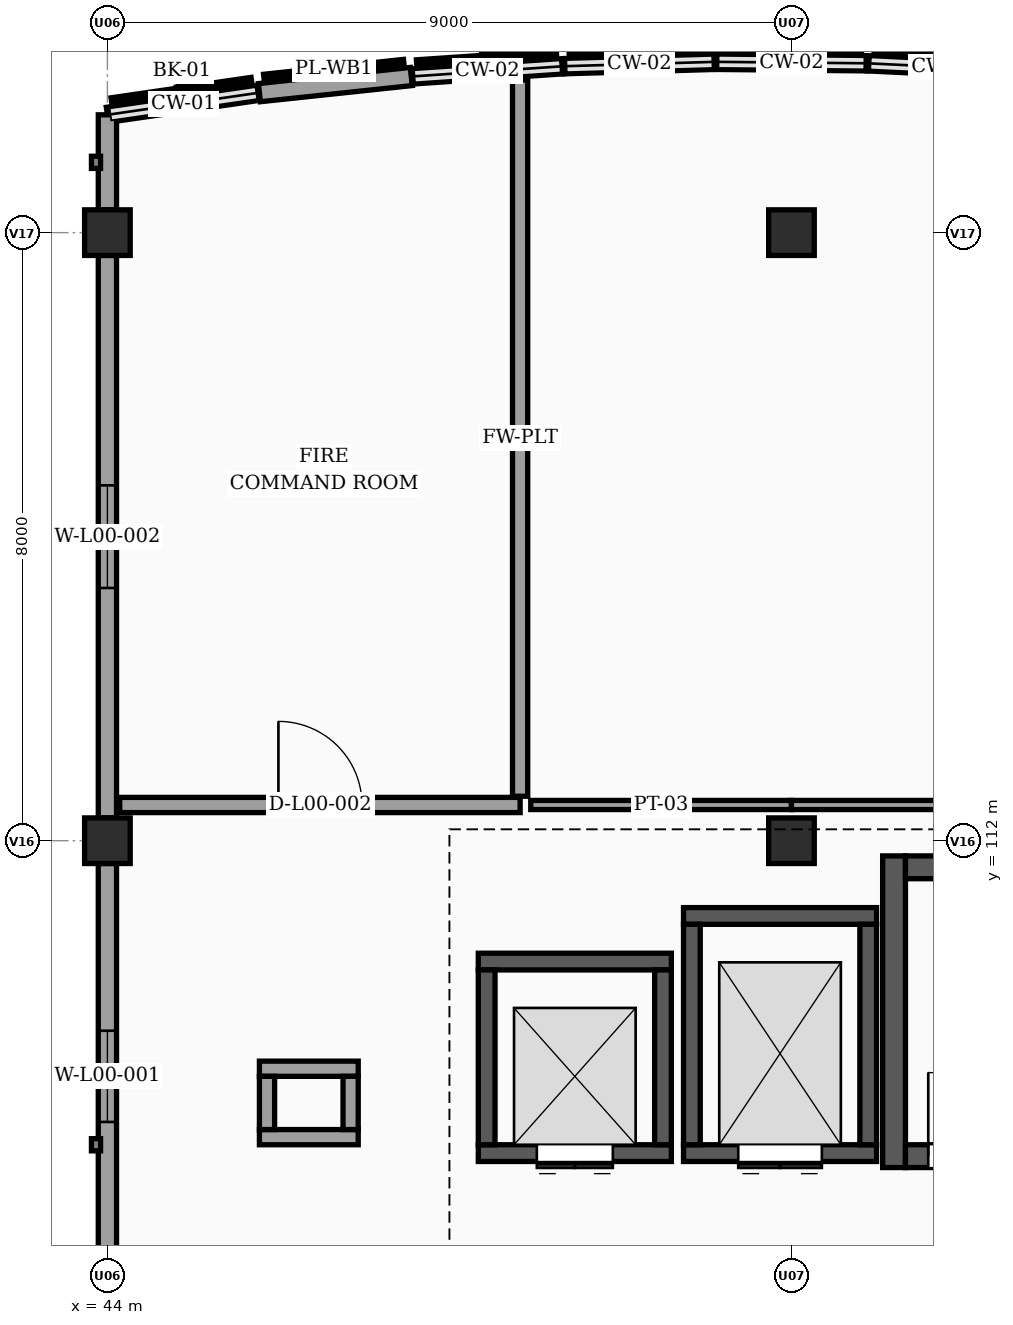
"""IFC4 building model, lengths in metres.
Left out: names, types, materials, properties, quantities, classifications, styles, units other than length and angle.
Written with IfcOpenShell. Run it as: python <this file> out.ifc"""

import sys

from ifc_helpers import new_model, si_unit, direction, frame, frame_2d, origin, origin_2d, place, context, subcontext, project, spatial, rectangle, extrude, element, fill, save


model = new_model("IFC4")
c1 = context("Model", 3, precision=1e-05, world=origin(), true_north=direction((0.0, 1.0)))
c2 = subcontext(c1, "Body", "Model", "MODEL_VIEW")
j1 = project(units=[si_unit("LENGTHUNIT", "METRE"), si_unit("PLANEANGLEUNIT", "RADIAN")], contexts=[c1])
p1 = place(None, origin())
s1 = spatial("IfcSite", under=j1, at=p1, CompositionType="ELEMENT")
p2 = place(p1, origin())
s2 = spatial("IfcBuilding", under=s1, at=p2, CompositionType="ELEMENT")
p3 = place(p2, origin())
s3 = spatial("IfcBuildingStorey", under=s2, at=p3, CompositionType="ELEMENT", Elevation=0.0)
for number, where, z_axis, x_axis in (
    (1, (44.0, 112.0, -0.2), (0.0, 0.0, 1.0), (1.0, 0.0, 0.0)),
    (2, (44.0, 120.0, -0.2), (0.0, 0.0, 1.0), (1.0, 0.0, 0.0)),
    (3, (53.0, 112.0, -0.2), (0.0, 0.0, 1.0), (1.0, 0.0, 0.0)),
    (4, (53.0, 120.0, -0.2), (0.0, 0.0, 1.0), (1.0, 0.0, 0.0)),
):
    element("IfcColumn", number, at=place(p3, frame(where, z_axis=z_axis, x_axis=x_axis)), inside=s3, PredefinedType="COLUMN", context=c2, shape_type="SweptSolid", body=[
        extrude(rectangle(XDim=0.6, YDim=0.6, at=origin_2d()), origin(), (0.0, 0.0, 1.0), 4.7),
    ])
p4 = place(p3, frame((44.0, 121.55, 0.0), z_axis=(0.0, 0.0, 1.0), x_axis=(0.989544477223, 0.144228040259, 0.0)))
e5 = element("IfcWall", 5, at=p4, inside=s3, PredefinedType="SOLIDWALL", context=c2, shape_type="SweptSolid", body=[
    extrude(rectangle(XDim=2.021, YDim=0.2, at=frame_2d((1.011, 0.0))), origin(), (0.0, 0.0, 1.0), 0.95),
])
p5 = place(p3, frame((46.0, 121.842, 0.0), z_axis=(0.0, 0.0, 1.0), x_axis=(0.994395160059, 0.105727317433, 0.0)))
e6 = element("IfcWall", 6, at=p5, inside=s3, PredefinedType="SOLIDWALL", context=c2, shape_type="SweptSolid", body=[
    extrude(rectangle(XDim=2.011, YDim=0.24, at=frame_2d((1.006, 0.0))), origin(), (0.0, 0.0, 1.0), 4.24),
])
p6 = place(p3, frame((48.0, 122.054, 0.0), z_axis=(0.0, 0.0, 1.0), x_axis=(0.997729302978, 0.067351599676, 0.0)))
e7 = element("IfcWall", 7, at=p6, inside=s3, PredefinedType="SOLIDWALL", context=c2, shape_type="SweptSolid", body=[
    extrude(rectangle(XDim=2.005, YDim=0.2, at=frame_2d((1.002, 0.0))), origin(), (0.0, 0.0, 1.0), 0.95),
])
p7 = place(p3, frame((50.0, 122.189, 0.0), z_axis=(0.0, 0.0, 1.0), x_axis=(0.999581770858, 0.028918564416, 0.0)))
e8 = element("IfcWall", 8, at=p7, inside=s3, PredefinedType="SOLIDWALL", context=c2, shape_type="SweptSolid", body=[
    extrude(rectangle(XDim=2.001, YDim=0.2, at=frame_2d((1.0, 0.0))), origin(), (0.0, 0.0, 1.0), 0.95),
])
p8 = place(p3, frame((52.0, 122.247, 0.0), z_axis=(0.0, 0.0, 1.0), x_axis=(0.999953504169, -0.009643106302, 0.0)))
e9 = element("IfcWall", 9, at=p8, inside=s3, PredefinedType="SOLIDWALL", context=c2, shape_type="SweptSolid", body=[
    extrude(rectangle(XDim=2.0, YDim=0.2, at=frame_2d((1.0, 0.0))), origin(), (0.0, 0.0, 1.0), 0.95),
])
p9 = place(p3, frame((54.0, 122.228, 0.0), z_axis=(0.0, 0.0, 1.0), x_axis=(0.99884540439, -0.048040172037, 0.0)))
e10 = element("IfcWall", 10, at=p9, inside=s3, PredefinedType="SOLIDWALL", context=c2, shape_type="SweptSolid", body=[
    extrude(rectangle(XDim=2.002, YDim=0.2, at=frame_2d((1.001, 0.0))), origin(), (0.0, 0.0, 1.0), 0.95),
])
p10 = place(p3, frame((44.0, 104.3, 0.0), z_axis=(0.0, 0.0, 1.0), x_axis=(0.0, 1.0, 0.0)))
e11 = element("IfcWall", 11, at=p10, inside=s3, PredefinedType="SOLIDWALL", context=c2, shape_type="SweptSolid", body=[
    extrude(rectangle(XDim=7.4, YDim=0.24, at=frame_2d((3.7, 0.0))), origin(), (0.0, 0.0, 1.0), 3.54),
])
p11 = place(p10, frame((4.0, 0.0, 0.95)))
e12 = element("IfcOpeningElement", 12, at=p11, cuts=e11, PredefinedType="OPENING", context=c2, shape_type="SweptSolid", body=[
    extrude(rectangle(XDim=1.2, YDim=1.5, at=frame_2d((0.6, 0.75))), frame((0.0, 0.13, 0.0), z_axis=(0.0, -1.0, 0.0), x_axis=(1.0, 0.0, 0.0)), (0.0, 0.0, 1.0), 0.26),
])
p12 = place(p3, frame((44.0, 112.3, 0.0), z_axis=(0.0, 0.0, 1.0), x_axis=(0.0, 1.0, 0.0)))
e13 = element("IfcWall", 13, at=p12, inside=s3, PredefinedType="SOLIDWALL", context=c2, shape_type="SweptSolid", body=[
    extrude(rectangle(XDim=7.4, YDim=0.24, at=frame_2d((3.7, 0.0))), origin(), (0.0, 0.0, 1.0), 3.54),
])
p13 = place(p12, frame((3.025, 0.0, 0.95)))
e14 = element("IfcOpeningElement", 14, at=p13, cuts=e13, PredefinedType="OPENING", context=c2, shape_type="SweptSolid", body=[
    extrude(rectangle(XDim=1.35, YDim=1.5, at=frame_2d((0.675, 0.75))), frame((0.0, 0.13, 0.0), z_axis=(0.0, -1.0, 0.0), x_axis=(1.0, 0.0, 0.0)), (0.0, 0.0, 1.0), 0.26),
])
p14 = place(p3, frame((44.0, 120.3, 0.0), z_axis=(0.0, 0.0, 1.0), x_axis=(0.0, 1.0, 0.0)))
e15 = element("IfcWall", 15, at=p14, inside=s3, PredefinedType="SOLIDWALL", context=c2, shape_type="SweptSolid", body=[
    extrude(rectangle(XDim=1.25, YDim=0.24, at=frame_2d((0.625, 0.0))), origin(), (0.0, 0.0, 1.0), 3.54),
])
p15 = place(p3, frame((54.35, 107.7, 0.0), z_axis=(0.0, 0.0, 1.0), x_axis=(0.0, 1.0, 0.0)))
e16 = element("IfcWall", 16, at=p15, inside=s3, PredefinedType="SHEAR", context=c2, shape_type="SweptSolid", body=[
    extrude(rectangle(XDim=4.1, YDim=0.3, at=frame_2d((2.05, 0.0))), origin(), (0.0, 0.0, 1.0), 4.24),
])
p16 = place(p3, frame((54.5, 107.85, 0.0), z_axis=(0.0, 0.0, 1.0), x_axis=(1.0, 0.0, 0.0)))
e17 = element("IfcWall", 17, at=p16, inside=s3, PredefinedType="SHEAR", context=c2, shape_type="SweptSolid", body=[
    extrude(rectangle(XDim=6.8, YDim=0.3, at=frame_2d((3.4, 0.0))), origin(), (0.0, 0.0, 1.0), 4.24),
])
p17 = place(p16, frame((0.3, 0.0, 0.0)))
e18 = element("IfcOpeningElement", 18, at=p17, cuts=e17, PredefinedType="OPENING", context=c2, shape_type="SweptSolid", body=[
    extrude(rectangle(XDim=1.1, YDim=2.15, at=frame_2d((0.55, 1.075))), frame((0.0, 0.16, 0.0), z_axis=(0.0, -1.0, 0.0), x_axis=(1.0, 0.0, 0.0)), (0.0, 0.0, 1.0), 0.32),
])
p18 = place(p3, frame((61.3, 111.65, 0.0), z_axis=(0.0, 0.0, 1.0), x_axis=(-1.0, 0.0, 0.0)))
e19 = element("IfcWall", 19, at=p18, inside=s3, PredefinedType="SHEAR", context=c2, shape_type="SweptSolid", body=[
    extrude(rectangle(XDim=6.8, YDim=0.3, at=frame_2d((3.4, 0.0))), origin(), (0.0, 0.0, 1.0), 4.24),
])
p19 = place(p3, frame((54.12, 107.89, 0.0), z_axis=(0.0, 0.0, 1.0), x_axis=(-1.0, 0.0, 0.0)))
e20 = element("IfcWall", 20, at=p19, inside=s3, PredefinedType="SHEAR", context=c2, shape_type="SweptSolid", body=[
    extrude(rectangle(XDim=2.54, YDim=0.22, at=frame_2d((1.27, 0.0))), origin(), (0.0, 0.0, 1.0), 4.24),
])
p20 = place(p19, frame((0.72, 0.0, 0.0)))
e21 = element("IfcOpeningElement", 21, at=p20, cuts=e20, PredefinedType="OPENING", context=c2, shape_type="SweptSolid", body=[
    extrude(rectangle(XDim=1.1, YDim=2.15, at=frame_2d((0.55, 1.075))), frame((0.0, 0.12, 0.0), z_axis=(0.0, -1.0, 0.0), x_axis=(1.0, 0.0, 0.0)), (0.0, 0.0, 1.0), 0.24),
])
p21 = place(p3, frame((51.58, 111.01, 0.0), z_axis=(0.0, 0.0, 1.0), x_axis=(1.0, 0.0, 0.0)))
e22 = element("IfcWall", 22, at=p21, inside=s3, PredefinedType="SHEAR", context=c2, shape_type="SweptSolid", body=[
    extrude(rectangle(XDim=2.54, YDim=0.22, at=frame_2d((1.27, 0.0))), origin(), (0.0, 0.0, 1.0), 4.24),
])
for number, where, z_axis, x_axis in (
    (23, (51.69, 108.0, 0.0), (0.0, 0.0, 1.0), (0.0, 1.0, 0.0)),
    (24, (54.01, 110.9, 0.0), (0.0, 0.0, 1.0), (0.0, -1.0, 0.0)),
):
    element("IfcWall", number, at=place(p3, frame(where, z_axis=z_axis, x_axis=x_axis)), inside=s3, PredefinedType="SHEAR", context=c2, shape_type="SweptSolid", body=[
        extrude(rectangle(XDim=2.9, YDim=0.22, at=frame_2d((1.45, 0.0))), origin(), (0.0, 0.0, 1.0), 4.24),
    ])
p22 = place(p3, frame((51.42, 107.89, 0.0), z_axis=(0.0, 0.0, 1.0), x_axis=(-1.0, 0.0, 0.0)))
e25 = element("IfcWall", 25, at=p22, inside=s3, PredefinedType="SHEAR", context=c2, shape_type="SweptSolid", body=[
    extrude(rectangle(XDim=2.54, YDim=0.22, at=frame_2d((1.27, 0.0))), origin(), (0.0, 0.0, 1.0), 4.24),
])
p23 = place(p22, frame((0.77, 0.0, 0.0)))
e26 = element("IfcOpeningElement", 26, at=p23, cuts=e25, PredefinedType="OPENING", context=c2, shape_type="SweptSolid", body=[
    extrude(rectangle(XDim=1.0, YDim=2.15, at=frame_2d((0.5, 1.075))), frame((0.0, 0.12, 0.0), z_axis=(0.0, -1.0, 0.0), x_axis=(1.0, 0.0, 0.0)), (0.0, 0.0, 1.0), 0.24),
])
p24 = place(p3, frame((48.88, 110.41, 0.0), z_axis=(0.0, 0.0, 1.0), x_axis=(1.0, 0.0, 0.0)))
e27 = element("IfcWall", 27, at=p24, inside=s3, PredefinedType="SHEAR", context=c2, shape_type="SweptSolid", body=[
    extrude(rectangle(XDim=2.54, YDim=0.22, at=frame_2d((1.27, 0.0))), origin(), (0.0, 0.0, 1.0), 4.24),
])
for number, where, z_axis, x_axis in (
    (28, (48.99, 108.0, 0.0), (0.0, 0.0, 1.0), (0.0, 1.0, 0.0)),
    (29, (51.31, 110.3, 0.0), (0.0, 0.0, 1.0), (0.0, -1.0, 0.0)),
):
    element("IfcWall", number, at=place(p3, frame(where, z_axis=z_axis, x_axis=x_axis)), inside=s3, PredefinedType="SHEAR", context=c2, shape_type="SweptSolid", body=[
        extrude(rectangle(XDim=2.3, YDim=0.22, at=frame_2d((1.15, 0.0))), origin(), (0.0, 0.0, 1.0), 4.24),
    ])
for number, where, z_axis, x_axis in (
    (30, (47.3, 108.1, 0.0), (0.0, 0.0, 1.0), (-1.0, 0.0, 0.0)),
    (31, (46.0, 109.0, 0.0), (0.0, 0.0, 1.0), (1.0, 0.0, 0.0)),
):
    element("IfcWall", number, at=place(p3, frame(where, z_axis=z_axis, x_axis=x_axis)), inside=s3, PredefinedType="PARTITIONING", context=c2, shape_type="SweptSolid", body=[
        extrude(rectangle(XDim=1.3, YDim=0.2, at=frame_2d((0.65, 0.0))), origin(), (0.0, 0.0, 1.0), 4.24),
    ])
p25 = place(p3, frame((46.1, 108.2, 0.0), z_axis=(0.0, 0.0, 1.0), x_axis=(0.0, 1.0, 0.0)))
e32 = element("IfcWall", 32, at=p25, inside=s3, PredefinedType="PARTITIONING", context=c2, shape_type="SweptSolid", body=[
    extrude(rectangle(XDim=0.7, YDim=0.2, at=frame_2d((0.35, 0.0))), origin(), (0.0, 0.0, 1.0), 4.24),
])
p26 = place(p3, frame((47.2, 108.9, 0.0), z_axis=(0.0, 0.0, 1.0), x_axis=(0.0, -1.0, 0.0)))
e33 = element("IfcWall", 33, at=p26, inside=s3, PredefinedType="PARTITIONING", context=c2, shape_type="SweptSolid", body=[
    extrude(rectangle(XDim=0.7, YDim=0.2, at=frame_2d((0.35, 0.0))), origin(), (0.0, 0.0, 1.0), 3.84),
])
p27 = place(p3, frame((44.162, 112.47, 0.0), z_axis=(0.0, 0.0, 1.0), x_axis=(1.0, 0.0, 0.0)))
e34 = element("IfcWall", 34, at=p27, inside=s3, PredefinedType="PARTITIONING", context=c2, shape_type="SweptSolid", body=[
    extrude(rectangle(XDim=5.268, YDim=0.2, at=frame_2d((2.634, 0.0))), origin(), (0.0, 0.0, 1.0), 3.44),
])
p28 = place(p27, frame((2.088, 0.0, 0.0)))
e35 = element("IfcOpeningElement", 35, at=p28, cuts=e34, PredefinedType="OPENING", context=c2, shape_type="SweptSolid", body=[
    extrude(rectangle(XDim=1.1, YDim=2.15, at=frame_2d((0.55, 1.075))), frame((0.0, 0.11, 0.0), z_axis=(0.0, -1.0, 0.0), x_axis=(1.0, 0.0, 0.0)), (0.0, 0.0, 1.0), 0.22),
])
p29 = place(p3, frame((49.43, 112.585, 0.0), z_axis=(0.0, 0.0, 1.0), x_axis=(0.0, 1.0, 0.0)))
e36 = element("IfcWall", 36, at=p29, inside=s3, PredefinedType="PARTITIONING", context=c2, shape_type="SweptSolid", body=[
    extrude(rectangle(XDim=9.424, YDim=0.2, at=frame_2d((4.712, 0.0))), origin(), (0.0, 0.0, 1.0), 4.24),
])
p30 = place(p3, frame((49.57, 112.47, 0.0), z_axis=(0.0, 0.0, 1.0), x_axis=(1.0, 0.0, 0.0)))
e37 = element("IfcWall", 37, at=p30, inside=s3, PredefinedType="PARTITIONING", context=c2, shape_type="SweptSolid", body=[
    extrude(rectangle(XDim=3.43, YDim=0.12, at=frame_2d((1.715, 0.0))), origin(), (0.0, 0.0, 1.0), 3.44),
])
p31 = place(p3, frame((53.0, 112.47, 0.0), z_axis=(0.0, 0.0, 1.0), x_axis=(1.0, 0.0, 0.0)))
e38 = element("IfcWall", 38, at=p31, inside=s3, PredefinedType="PARTITIONING", context=c2, shape_type="SweptSolid", body=[
    extrude(rectangle(XDim=9.0, YDim=0.12, at=frame_2d((4.5, 0.0))), origin(), (0.0, 0.0, 1.0), 4.24),
])
p32 = place(p31, frame((4.01, 0.0, 0.0)))
e39 = element("IfcOpeningElement", 39, at=p32, cuts=e38, PredefinedType="OPENING", context=c2, shape_type="SweptSolid", body=[
    extrude(rectangle(XDim=0.98, YDim=2.1, at=frame_2d((0.49, 1.05))), frame((0.0, 0.07, 0.0), z_axis=(0.0, -1.0, 0.0), x_axis=(1.0, 0.0, 0.0)), (0.0, 0.0, 1.0), 0.14),
])
p33 = place(p11, origin())
e40 = element("IfcWindow", 40, at=p33, inside=s3, PartitioningType="SINGLE_PANEL", PredefinedType="WINDOW", context=c2, shape_type="SweptSolid", body=[
    extrude(rectangle(XDim=1.2, YDim=1.5, at=frame_2d((0.6, 0.75))), frame((0.0, 0.03, 0.0), z_axis=(0.0, -1.0, 0.0), x_axis=(1.0, 0.0, 0.0)), (0.0, 0.0, 1.0), 0.06),
])
fill(e12, e40)
p34 = place(p13, origin())
e41 = element("IfcWindow", 41, at=p34, inside=s3, PartitioningType="SINGLE_PANEL", PredefinedType="WINDOW", context=c2, shape_type="SweptSolid", body=[
    extrude(rectangle(XDim=1.35, YDim=1.5, at=frame_2d((0.675, 0.75))), frame((0.0, 0.03, 0.0), z_axis=(0.0, -1.0, 0.0), x_axis=(1.0, 0.0, 0.0)), (0.0, 0.0, 1.0), 0.06),
])
fill(e14, e41)
p35 = place(p17, origin())
e42 = element("IfcDoor", 42, at=p35, inside=s3, OperationType="SINGLE_SWING_LEFT", PredefinedType="DOOR", context=c2, shape_type="SweptSolid", body=[
    extrude(rectangle(XDim=1.1, YDim=2.15, at=frame_2d((0.55, 1.075))), frame((0.0, 0.025, 0.0), z_axis=(0.0, -1.0, 0.0), x_axis=(1.0, 0.0, 0.0)), (0.0, 0.0, 1.0), 0.05),
])
fill(e18, e42)
p36 = place(p20, origin())
e43 = element("IfcDoor", 43, at=p36, inside=s3, OperationType="DOUBLE_DOOR_SLIDING", PredefinedType="DOOR", context=c2, shape_type="SweptSolid", body=[
    extrude(rectangle(XDim=1.1, YDim=2.15, at=frame_2d((0.55, 1.075))), frame((0.0, 0.025, 0.0), z_axis=(0.0, -1.0, 0.0), x_axis=(1.0, 0.0, 0.0)), (0.0, 0.0, 1.0), 0.05),
])
fill(e21, e43)
p37 = place(p23, origin())
e44 = element("IfcDoor", 44, at=p37, inside=s3, OperationType="DOUBLE_DOOR_SLIDING", PredefinedType="DOOR", context=c2, shape_type="SweptSolid", body=[
    extrude(rectangle(XDim=1.0, YDim=2.15, at=frame_2d((0.5, 1.075))), frame((0.0, 0.025, 0.0), z_axis=(0.0, -1.0, 0.0), x_axis=(1.0, 0.0, 0.0)), (0.0, 0.0, 1.0), 0.05),
])
fill(e26, e44)
p38 = place(p28, origin())
e45 = element("IfcDoor", 45, at=p38, inside=s3, OperationType="SINGLE_SWING_LEFT", PredefinedType="DOOR", context=c2, shape_type="SweptSolid", body=[
    extrude(rectangle(XDim=1.1, YDim=2.15, at=frame_2d((0.55, 1.075))), frame((0.0, 0.025, 0.0), z_axis=(0.0, -1.0, 0.0), x_axis=(1.0, 0.0, 0.0)), (0.0, 0.0, 1.0), 0.05),
])
fill(e35, e45)
save(model, sys.argv[1])
